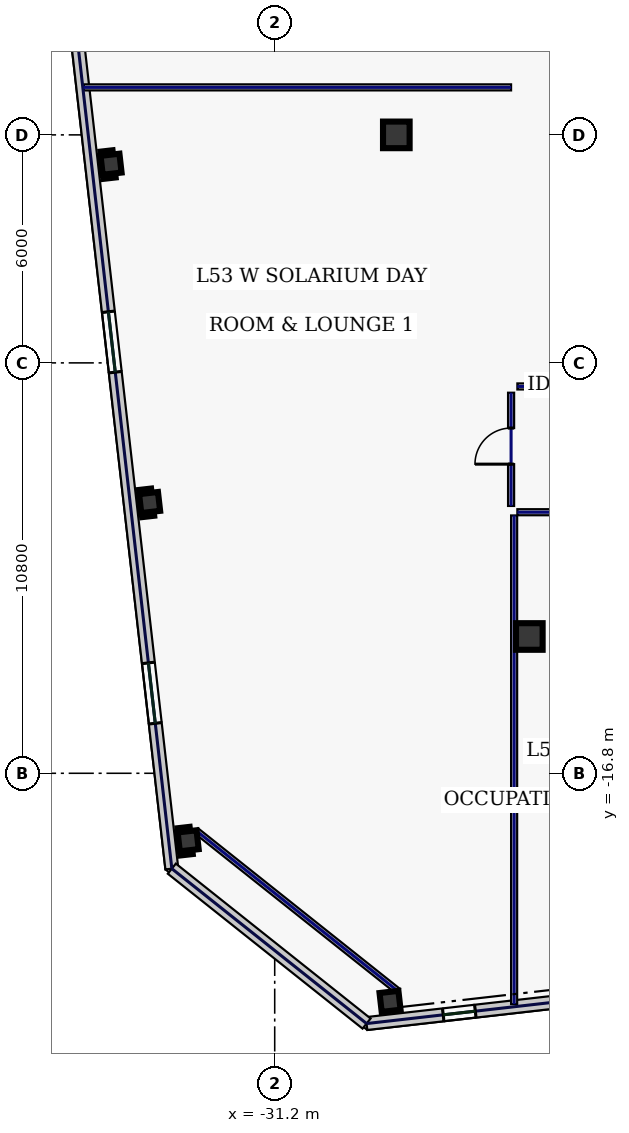
"""IFC4 building model, lengths in metres.
Left out: names, types, materials, properties, quantities, classifications, styles, units other than length and angle.
Written with IfcOpenShell. Run it as: python <this file> out.ifc"""

import sys

from ifc_helpers import new_model, si_unit, direction, frame, frame_2d, origin, origin_2d, place, context, subcontext, project, spatial, rectangle, hollow_rectangle, extrude, element, fill, save


model = new_model("IFC4")
c1 = context("Model", 3, precision=1e-05, world=origin(), true_north=direction((0.0, 1.0)))
c2 = subcontext(c1, "Body", "Model", "MODEL_VIEW")
j1 = project(units=[si_unit("LENGTHUNIT", "METRE"), si_unit("PLANEANGLEUNIT", "RADIAN")], contexts=[c1])
p1 = place(None, origin())
s1 = spatial("IfcSite", under=j1, at=p1, CompositionType="ELEMENT")
p2 = place(p1, origin())
s2 = spatial("IfcBuilding", under=s1, at=p2, CompositionType="ELEMENT")
p3 = place(p2, frame((0.0, 0.0, 230.2)))
s3 = spatial("IfcBuildingStorey", under=s2, at=p3, CompositionType="ELEMENT", Elevation=230.2)
for number, where, z_axis, x_axis in (
    (1, (-24.5, -13.2, 0.0), (0.0, 0.0, 1.0), (1.0, 0.0, 0.0)),
    (2, (-28.0, 0.0, 0.0), (0.0, 0.0, 1.0), (1.0, 0.0, 0.0)),
):
    element("IfcColumn", number, at=place(p3, frame(where, z_axis=z_axis, x_axis=x_axis)), inside=s3, PredefinedType="COLUMN", context=c2, shape_type="SweptSolid", body=[
        extrude(hollow_rectangle(XDim=0.7, YDim=0.7, WallThickness=0.032, at=origin_2d()), origin(), (0.0, 0.0, 1.0), 3.74),
    ])
for number, where, z_axis, x_axis in (
    (3, (-28.165, -22.802, 0.0), (0.0, 0.0, 1.0), (0.994, 0.113, 0.0)),
    (4, (-35.506, -0.772, 0.0), (0.0, 0.0, 1.0), (0.994, 0.113, 0.0)),
    (5, (-34.491, -9.674, 0.0), (0.0, 0.0, 1.0), (0.994, 0.113, 0.0)),
    (6, (-33.477, -18.577, 0.0), (0.0, 0.0, 1.0), (0.994, 0.113, 0.0)),
):
    element("IfcColumn", number, at=place(p3, frame(where, z_axis=z_axis, x_axis=x_axis)), inside=s3, PredefinedType="COLUMN", context=c2, shape_type="SweptSolid", body=[
        extrude(hollow_rectangle(XDim=0.5, YDim=0.5, WallThickness=0.025, at=origin_2d()), origin(), (0.0, 0.0, 1.0), 3.74),
    ])
p4 = place(p3, frame((-28.783, -23.386, 0.0), z_axis=(0.0, 0.0, 1.0), x_axis=(0.993572271362, 0.113199565282, 0.0)))
e7 = element("IfcWall", 7, at=p4, inside=s3, PredefinedType="STANDARD", context=c2, shape_type="SweptSolid", body=[
    extrude(rectangle(XDim=18.651, YDim=0.34, at=frame_2d((9.326, 0.0))), origin(), (0.0, 0.0, 1.0), 3.74),
])
p5 = place(p4, frame((2.03, 0.0, 0.88)))
e8 = element("IfcOpeningElement", 8, at=p5, cuts=e7, PredefinedType="OPENING", context=c2, shape_type="SweptSolid", body=[
    extrude(rectangle(XDim=0.85, YDim=1.85, at=frame_2d((0.425, 0.925))), frame((0.0, 0.18, 0.0), z_axis=(0.0, -1.0, 0.0), x_axis=(1.0, 0.0, 0.0)), (0.0, 0.0, 1.0), 0.36),
])
p6 = place(p4, frame((5.779, 0.0, 0.88)))
e9 = element("IfcOpeningElement", 9, at=p6, cuts=e7, PredefinedType="OPENING", context=c2, shape_type="SweptSolid", body=[
    extrude(rectangle(XDim=1.7, YDim=1.95, at=frame_2d((0.85, 0.975))), frame((0.0, 0.18, 0.0), z_axis=(0.0, -1.0, 0.0), x_axis=(1.0, 0.0, 0.0)), (0.0, 0.0, 1.0), 0.36),
])
p7 = place(p4, frame((13.927, 0.0, 0.88)))
e10 = element("IfcOpeningElement", 10, at=p7, cuts=e7, PredefinedType="OPENING", context=c2, shape_type="SweptSolid", body=[
    extrude(rectangle(XDim=1.7, YDim=1.95, at=frame_2d((0.85, 0.975))), frame((0.0, 0.18, 0.0), z_axis=(0.0, -1.0, 0.0), x_axis=(1.0, 0.0, 0.0)), (0.0, 0.0, 1.0), 0.36),
])
p8 = place(p3, frame((-38.118, 17.651, 0.0), z_axis=(0.0, 0.0, 1.0), x_axis=(0.11320360501, -0.9935718111, 0.0)))
e11 = element("IfcWall", 11, at=p8, inside=s3, PredefinedType="STANDARD", context=c2, shape_type="SweptSolid", body=[
    extrude(rectangle(XDim=37.2, YDim=0.34, at=frame_2d((18.6, 0.0))), origin(), (0.0, 0.0, 1.0), 3.74),
])
p9 = place(p8, frame((3.85, 0.0, 0.58)))
e12 = element("IfcOpeningElement", 12, at=p9, cuts=e11, PredefinedType="OPENING", context=c2, shape_type="SweptSolid", body=[
    extrude(rectangle(XDim=1.6, YDim=2.3, at=frame_2d((0.8, 1.15))), frame((0.0, 0.18, 0.0), z_axis=(0.0, -1.0, 0.0), x_axis=(1.0, 0.0, 0.0)), (0.0, 0.0, 1.0), 0.36),
])
p10 = place(p8, frame((13.15, 0.0, 0.58)))
e13 = element("IfcOpeningElement", 13, at=p10, cuts=e11, PredefinedType="OPENING", context=c2, shape_type="SweptSolid", body=[
    extrude(rectangle(XDim=1.6, YDim=2.3, at=frame_2d((0.8, 1.15))), frame((0.0, 0.18, 0.0), z_axis=(0.0, -1.0, 0.0), x_axis=(1.0, 0.0, 0.0)), (0.0, 0.0, 1.0), 0.36),
])
p11 = place(p8, frame((22.45, 0.0, 0.58)))
e14 = element("IfcOpeningElement", 14, at=p11, cuts=e11, PredefinedType="OPENING", context=c2, shape_type="SweptSolid", body=[
    extrude(rectangle(XDim=1.6, YDim=2.3, at=frame_2d((0.8, 1.15))), frame((0.0, 0.18, 0.0), z_axis=(0.0, -1.0, 0.0), x_axis=(1.0, 0.0, 0.0)), (0.0, 0.0, 1.0), 0.36),
])
p12 = place(p8, frame((31.75, 0.0, 0.58)))
e15 = element("IfcOpeningElement", 15, at=p12, cuts=e11, PredefinedType="OPENING", context=c2, shape_type="SweptSolid", body=[
    extrude(rectangle(XDim=1.6, YDim=2.3, at=frame_2d((0.8, 1.15))), frame((0.0, 0.18, 0.0), z_axis=(0.0, -1.0, 0.0), x_axis=(1.0, 0.0, 0.0)), (0.0, 0.0, 1.0), 0.36),
])
p13 = place(p3, frame((-33.907, -19.31, 0.0), z_axis=(0.0, 0.0, 1.0), x_axis=(0.782611787794, -0.622510071892, 0.0)))
e16 = element("IfcWall", 16, at=p13, inside=s3, PredefinedType="STANDARD", context=c2, shape_type="SweptSolid", body=[
    extrude(rectangle(XDim=6.548, YDim=0.34, at=frame_2d((3.274, 0.0))), origin(), (0.0, 0.0, 1.0), 3.74),
])
p14 = place(p3, frame((-33.265, -18.311, 0.0), z_axis=(0.0, 0.0, 1.0), x_axis=(0.782602647064, -0.622521563328, 0.0)))
e17 = element("IfcWall", 17, at=p14, inside=s3, PredefinedType="PARTITIONING", context=c2, shape_type="SweptSolid", body=[
    extrude(rectangle(XDim=6.788, YDim=0.16, at=frame_2d((3.394, 0.0))), origin(), (0.0, 0.0, 1.0), 3.74),
])
p15 = place(p3, frame((-24.98, -9.765, 0.0), z_axis=(0.0, 0.0, 1.0), x_axis=(0.0, 1.0, 0.0)))
e18 = element("IfcWall", 18, at=p15, inside=s3, PredefinedType="PARTITIONING", context=c2, shape_type="SweptSolid", body=[
    extrude(rectangle(XDim=2.98, YDim=0.16, at=frame_2d((1.49, 0.0))), origin(), (0.0, 0.0, 1.0), 3.74),
])
p16 = place(p15, frame((1.1, 0.0, 0.0)))
e19 = element("IfcOpeningElement", 19, at=p16, cuts=e18, PredefinedType="OPENING", context=c2, shape_type="SweptSolid", body=[
    extrude(rectangle(XDim=0.95, YDim=2.2, at=frame_2d((0.475, 1.1))), frame((0.0, 0.09, 0.0), z_axis=(0.0, -1.0, 0.0), x_axis=(1.0, 0.0, 0.0)), (0.0, 0.0, 1.0), 0.18),
])
p17 = place(p3, frame((-24.815, -6.62, 0.0), z_axis=(0.0, 0.0, 1.0), x_axis=(1.0, 0.0, 0.0)))
e20 = element("IfcWall", 20, at=p17, inside=s3, PredefinedType="PARTITIONING", context=c2, shape_type="SweptSolid", body=[
    extrude(rectangle(XDim=14.185, YDim=0.16, at=frame_2d((7.093, 0.0))), origin(), (0.0, 0.0, 1.0), 3.74),
])
p18 = place(p3, frame((24.815, -9.93, 0.0), z_axis=(0.0, 0.0, 1.0), x_axis=(-1.0, 0.0, 0.0)))
e21 = element("IfcWall", 21, at=p18, inside=s3, PredefinedType="PARTITIONING", context=c2, shape_type="SweptSolid", body=[
    extrude(rectangle(XDim=49.63, YDim=0.16, at=frame_2d((24.815, 0.0))), origin(), (0.0, 0.0, 1.0), 3.74),
])
p19 = place(p18, frame((45.733, 0.0, 0.0)))
e22 = element("IfcOpeningElement", 22, at=p19, cuts=e21, PredefinedType="OPENING", context=c2, shape_type="SweptSolid", body=[
    extrude(rectangle(XDim=0.95, YDim=2.2, at=frame_2d((0.475, 1.1))), frame((0.0, 0.09, 0.0), z_axis=(0.0, -1.0, 0.0), x_axis=(1.0, 0.0, 0.0)), (0.0, 0.0, 1.0), 0.18),
])
p20 = place(p18, frame((39.583, 0.0, 0.0)))
e23 = element("IfcOpeningElement", 23, at=p20, cuts=e21, PredefinedType="OPENING", context=c2, shape_type="SweptSolid", body=[
    extrude(rectangle(XDim=0.95, YDim=2.2, at=frame_2d((0.475, 1.1))), frame((0.0, 0.09, 0.0), z_axis=(0.0, -1.0, 0.0), x_axis=(1.0, 0.0, 0.0)), (0.0, 0.0, 1.0), 0.18),
])
p21 = place(p18, frame((29.625, 0.0, 0.0)))
e24 = element("IfcOpeningElement", 24, at=p21, cuts=e21, PredefinedType="OPENING", context=c2, shape_type="SweptSolid", body=[
    extrude(rectangle(XDim=0.95, YDim=2.2, at=frame_2d((0.475, 1.1))), frame((0.0, 0.09, 0.0), z_axis=(0.0, -1.0, 0.0), x_axis=(1.0, 0.0, 0.0)), (0.0, 0.0, 1.0), 0.18),
])
p22 = place(p18, frame((15.46, 0.0, 0.0)))
e25 = element("IfcOpeningElement", 25, at=p22, cuts=e21, PredefinedType="OPENING", context=c2, shape_type="SweptSolid", body=[
    extrude(rectangle(XDim=0.95, YDim=2.2, at=frame_2d((0.475, 1.1))), frame((0.0, 0.09, 0.0), z_axis=(0.0, -1.0, 0.0), x_axis=(1.0, 0.0, 0.0)), (0.0, 0.0, 1.0), 0.18),
])
p23 = place(p18, frame((4.109, 0.0, 0.0)))
e26 = element("IfcOpeningElement", 26, at=p23, cuts=e21, PredefinedType="OPENING", context=c2, shape_type="SweptSolid", body=[
    extrude(rectangle(XDim=1.05, YDim=2.2, at=frame_2d((0.525, 1.1))), frame((0.0, 0.09, 0.0), z_axis=(0.0, -1.0, 0.0), x_axis=(1.0, 0.0, 0.0)), (0.0, 0.0, 1.0), 0.18),
])
p24 = place(p3, frame((-24.9, -22.873, 0.0), z_axis=(0.0, 0.0, 1.0), x_axis=(0.0, 1.0, 0.0)))
e27 = element("IfcWall", 27, at=p24, inside=s3, PredefinedType="PARTITIONING", context=c2, shape_type="SweptSolid", body=[
    extrude(rectangle(XDim=12.858, YDim=0.16, at=frame_2d((6.429, 0.0))), origin(), (0.0, 0.0, 1.0), 3.74),
])
p25 = place(p3, frame((-36.229, 1.25, 0.0), z_axis=(0.0, 0.0, 1.0), x_axis=(1.0, 0.0, 0.0)))
e28 = element("IfcWall", 28, at=p25, inside=s3, PredefinedType="PARTITIONING", context=c2, shape_type="SweptSolid", body=[
    extrude(rectangle(XDim=11.25, YDim=0.16, at=frame_2d((5.625, 0.0))), origin(), (0.0, 0.0, 1.0), 3.74),
])
p26 = place(p5, origin())
e29 = element("IfcWindow", 29, at=p26, inside=s3, PartitioningType="SINGLE_PANEL", PredefinedType="WINDOW", context=c2, shape_type="SweptSolid", body=[
    extrude(rectangle(XDim=0.85, YDim=1.85, at=frame_2d((0.425, 0.925))), frame((0.0, 0.03, 0.0), z_axis=(0.0, -1.0, 0.0), x_axis=(1.0, 0.0, 0.0)), (0.0, 0.0, 1.0), 0.06),
])
fill(e8, e29)
p27 = place(p11, origin())
e30 = element("IfcWindow", 30, at=p27, inside=s3, PartitioningType="SINGLE_PANEL", PredefinedType="WINDOW", context=c2, shape_type="SweptSolid", body=[
    extrude(rectangle(XDim=1.6, YDim=2.3, at=frame_2d((0.8, 1.15))), frame((0.0, 0.03, 0.0), z_axis=(0.0, -1.0, 0.0), x_axis=(1.0, 0.0, 0.0)), (0.0, 0.0, 1.0), 0.06),
])
fill(e14, e30)
p28 = place(p12, origin())
e31 = element("IfcWindow", 31, at=p28, inside=s3, PartitioningType="SINGLE_PANEL", PredefinedType="WINDOW", context=c2, shape_type="SweptSolid", body=[
    extrude(rectangle(XDim=1.6, YDim=2.3, at=frame_2d((0.8, 1.15))), frame((0.0, 0.03, 0.0), z_axis=(0.0, -1.0, 0.0), x_axis=(1.0, 0.0, 0.0)), (0.0, 0.0, 1.0), 0.06),
])
fill(e15, e31)
p29 = place(p16, origin())
e32 = element("IfcDoor", 32, at=p29, inside=s3, OperationType="SINGLE_SWING_LEFT", PredefinedType="DOOR", context=c2, shape_type="SweptSolid", body=[
    extrude(rectangle(XDim=0.95, YDim=2.2, at=frame_2d((0.475, 1.1))), frame((0.0, 0.025, 0.0), z_axis=(0.0, -1.0, 0.0), x_axis=(1.0, 0.0, 0.0)), (0.0, 0.0, 1.0), 0.05),
])
fill(e19, e32)
save(model, sys.argv[1])
